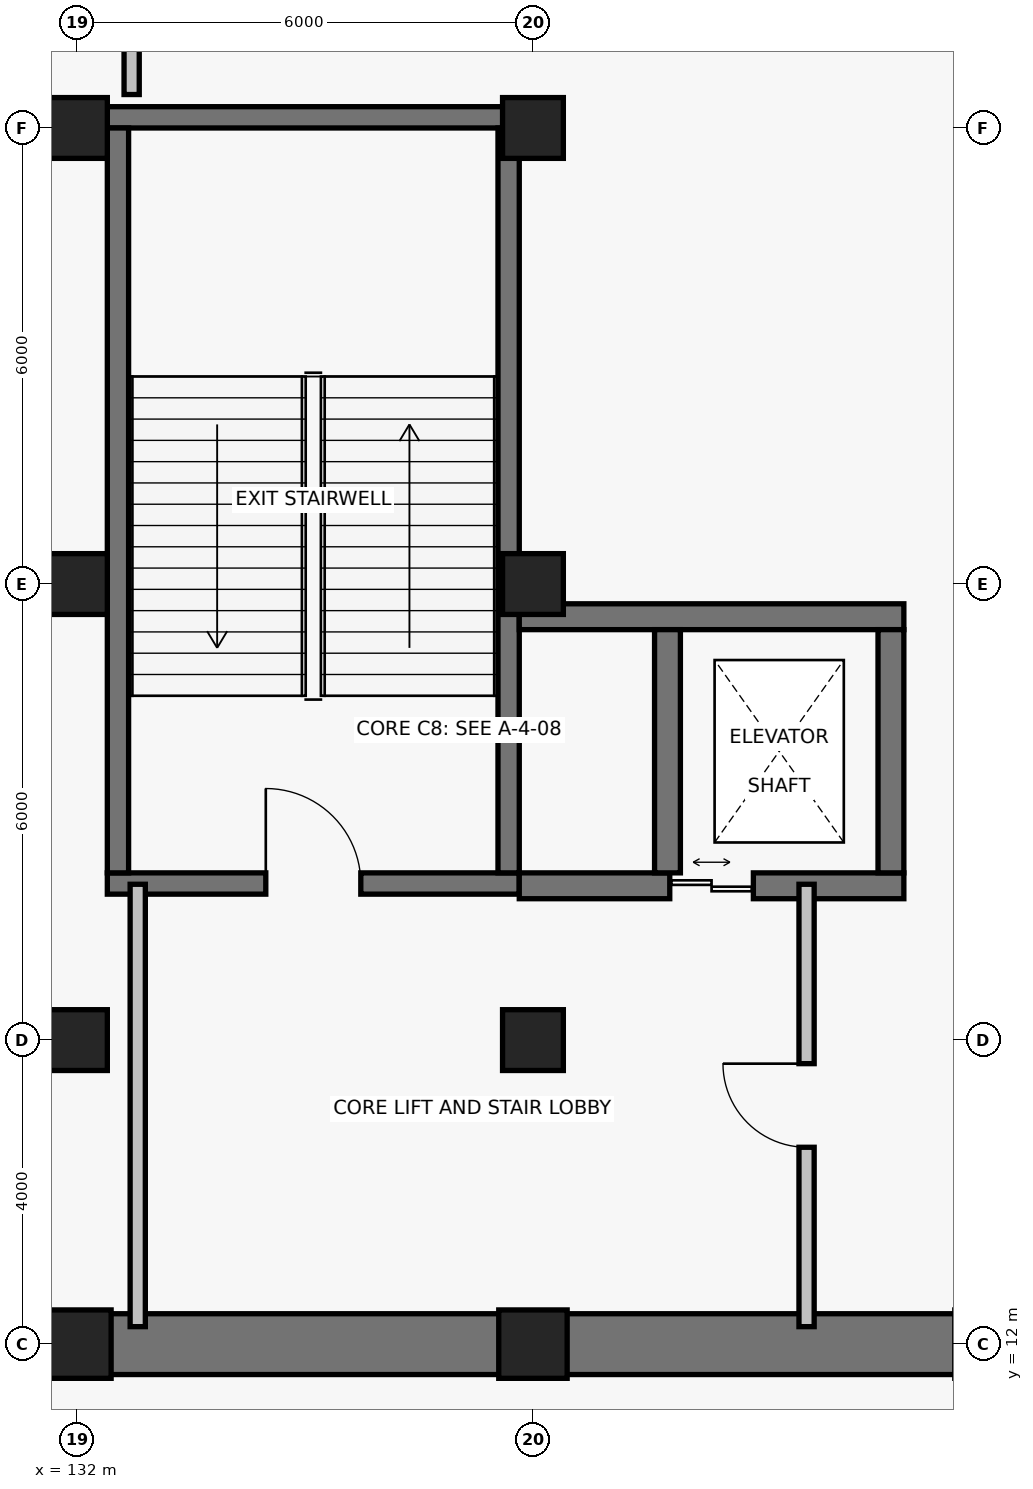
"""IFC4 building model, lengths in metres.
Left out: names, types, materials, properties, quantities, classifications, styles, units other than length and angle.
Written with IfcOpenShell. Run it as: python <this file> out.ifc"""

import sys

from ifc_helpers import new_model, si_unit, direction, frame, frame_2d, origin, origin_2d, place, context, subcontext, project, spatial, rectangle, extrude, element, fill, save


model = new_model("IFC4")
c1 = context("Model", 3, precision=1e-05, world=origin(), true_north=direction((0.0, 1.0)))
c2 = subcontext(c1, "Body", "Model", "MODEL_VIEW")
j1 = project(units=[si_unit("LENGTHUNIT", "METRE"), si_unit("PLANEANGLEUNIT", "RADIAN")], contexts=[c1])
p1 = place(None, origin())
s1 = spatial("IfcSite", under=j1, at=p1, CompositionType="ELEMENT")
p2 = place(p1, origin())
s2 = spatial("IfcBuilding", under=s1, at=p2, CompositionType="ELEMENT")
p3 = place(p2, frame((0.0, 0.0, -10.4)))
s3 = spatial("IfcBuildingStorey", under=s2, at=p3, CompositionType="ELEMENT", Elevation=-10.4)
p4 = place(p3, frame((132.0, 12.0, 0.0), z_axis=(0.0, 0.0, 1.0), x_axis=(1.0, 0.0, 0.0)))
e1 = element("IfcColumn", 1, at=p4, inside=s3, PredefinedType="COLUMN", context=c2, shape_type="SweptSolid", body=[
    extrude(rectangle(XDim=0.9, YDim=0.9, at=origin_2d()), origin(), (0.0, 0.0, 1.0), 5.6),
])
for number, where, z_axis, x_axis in (
    (2, (132.0, 16.0, 0.0), (0.0, 0.0, 1.0), (1.0, 0.0, 0.0)),
    (3, (132.0, 22.0, 0.0), (0.0, 0.0, 1.0), (1.0, 0.0, 0.0)),
    (4, (132.0, 28.0, 0.0), (0.0, 0.0, 1.0), (1.0, 0.0, 0.0)),
):
    element("IfcColumn", number, at=place(p3, frame(where, z_axis=z_axis, x_axis=x_axis)), inside=s3, PredefinedType="COLUMN", context=c2, shape_type="SweptSolid", body=[
        extrude(rectangle(XDim=0.8, YDim=0.8, at=origin_2d()), origin(), (0.0, 0.0, 1.0), 5.6),
    ])
p5 = place(p3, frame((138.0, 12.0, 0.0), z_axis=(0.0, 0.0, 1.0), x_axis=(1.0, 0.0, 0.0)))
e5 = element("IfcColumn", 5, at=p5, inside=s3, PredefinedType="COLUMN", context=c2, shape_type="SweptSolid", body=[
    extrude(rectangle(XDim=0.9, YDim=0.9, at=origin_2d()), origin(), (0.0, 0.0, 1.0), 5.6),
])
for number, where, z_axis, x_axis in (
    (6, (138.0, 16.0, 0.0), (0.0, 0.0, 1.0), (1.0, 0.0, 0.0)),
    (7, (138.0, 22.0, 0.0), (0.0, 0.0, 1.0), (1.0, 0.0, 0.0)),
    (8, (138.0, 28.0, 0.0), (0.0, 0.0, 1.0), (1.0, 0.0, 0.0)),
):
    element("IfcColumn", number, at=place(p3, frame(where, z_axis=z_axis, x_axis=x_axis)), inside=s3, PredefinedType="COLUMN", context=c2, shape_type="SweptSolid", body=[
        extrude(rectangle(XDim=0.8, YDim=0.8, at=origin_2d()), origin(), (0.0, 0.0, 1.0), 5.6),
    ])
for number, where, z_axis, x_axis in (
    (9, (108.0, 12.0, 0.0), (0.0, 0.0, 1.0), (1.0, 0.0, 0.0)),
    (10, (138.0, 12.0, 0.0), (0.0, 0.0, 1.0), (1.0, 0.0, 0.0)),
):
    element("IfcWall", number, at=place(p3, frame(where, z_axis=z_axis, x_axis=x_axis)), inside=s3, PredefinedType="USERDEFINED", context=c2, shape_type="SweptSolid", body=[
        extrude(rectangle(XDim=30.0, YDim=0.8, at=frame_2d((15.0, 0.0))), origin(), (0.0, 0.0, 1.0), 5.15),
    ])
p6 = place(p3, frame((132.4, 18.06, 0.0), z_axis=(0.0, 0.0, 1.0), x_axis=(1.0, 0.0, 0.0)))
e11 = element("IfcWall", 11, at=p6, inside=s3, PredefinedType="SHEAR", context=c2, shape_type="SweptSolid", body=[
    extrude(rectangle(XDim=5.42, YDim=0.28, at=frame_2d((2.71, 0.0))), origin(), (0.0, 0.0, 1.0), 5.15),
])
p7 = place(p6, frame((2.085, 0.0, 0.0)))
e12 = element("IfcOpeningElement", 12, at=p7, cuts=e11, PredefinedType="OPENING", context=c2, shape_type="SweptSolid", body=[
    extrude(rectangle(XDim=1.25, YDim=2.2, at=frame_2d((0.625, 1.1))), frame((0.0, 0.155, 0.0), z_axis=(0.0, -1.0, 0.0), x_axis=(1.0, 0.0, 0.0)), (0.0, 0.0, 1.0), 0.31),
])
p8 = place(p3, frame((137.82, 28.14, 0.0), z_axis=(0.0, 0.0, 1.0), x_axis=(-1.0, 0.0, 0.0)))
e13 = element("IfcWall", 13, at=p8, inside=s3, PredefinedType="SHEAR", context=c2, shape_type="SweptSolid", body=[
    extrude(rectangle(XDim=5.42, YDim=0.28, at=frame_2d((2.71, 0.0))), origin(), (0.0, 0.0, 1.0), 5.15),
])
for number, where, z_axis, x_axis in (
    (14, (132.54, 28.0, 0.0), (0.0, 0.0, 1.0), (0.0, -1.0, 0.0)),
    (15, (137.68, 18.2, 0.0), (0.0, 0.0, 1.0), (0.0, 1.0, 0.0)),
):
    element("IfcWall", number, at=place(p3, frame(where, z_axis=z_axis, x_axis=x_axis)), inside=s3, PredefinedType="SHEAR", context=c2, shape_type="SweptSolid", body=[
        extrude(rectangle(XDim=9.8, YDim=0.28, at=frame_2d((4.9, 0.0))), origin(), (0.0, 0.0, 1.0), 5.15),
    ])
p9 = place(p3, frame((137.82, 18.03, 0.0), z_axis=(0.0, 0.0, 1.0), x_axis=(1.0, 0.0, 0.0)))
e16 = element("IfcWall", 16, at=p9, inside=s3, PredefinedType="SHEAR", context=c2, shape_type="SweptSolid", body=[
    extrude(rectangle(XDim=5.06, YDim=0.34, at=frame_2d((2.53, 0.0))), origin(), (0.0, 0.0, 1.0), 5.15),
])
p10 = place(p9, frame((1.98, 0.0, 0.0)))
e17 = element("IfcOpeningElement", 17, at=p10, cuts=e16, PredefinedType="OPENING", context=c2, shape_type="SweptSolid", body=[
    extrude(rectangle(XDim=1.1, YDim=2.2, at=frame_2d((0.55, 1.1))), frame((0.0, 0.185, 0.0), z_axis=(0.0, -1.0, 0.0), x_axis=(1.0, 0.0, 0.0)), (0.0, 0.0, 1.0), 0.37),
])
p11 = place(p3, frame((142.88, 21.57, 0.0), z_axis=(0.0, 0.0, 1.0), x_axis=(-1.0, 0.0, 0.0)))
e18 = element("IfcWall", 18, at=p11, inside=s3, PredefinedType="SHEAR", context=c2, shape_type="SweptSolid", body=[
    extrude(rectangle(XDim=5.06, YDim=0.34, at=frame_2d((2.53, 0.0))), origin(), (0.0, 0.0, 1.0), 5.15),
])
for number, where, z_axis, x_axis in (
    (19, (139.77, 21.4, 0.0), (0.0, 0.0, 1.0), (0.0, -1.0, 0.0)),
    (20, (142.71, 18.2, 0.0), (0.0, 0.0, 1.0), (0.0, 1.0, 0.0)),
):
    element("IfcWall", number, at=place(p3, frame(where, z_axis=z_axis, x_axis=x_axis)), inside=s3, PredefinedType="SHEAR", context=c2, shape_type="SweptSolid", body=[
        extrude(rectangle(XDim=3.2, YDim=0.34, at=frame_2d((1.6, 0.0))), origin(), (0.0, 0.0, 1.0), 5.15),
    ])
p12 = place(p3, frame((132.8, 18.05, 0.0), z_axis=(0.0, 0.0, 1.0), x_axis=(0.0, -1.0, 0.0)))
e21 = element("IfcWall", 21, at=p12, inside=s3, PredefinedType="PARTITIONING", context=c2, shape_type="SweptSolid", body=[
    extrude(rectangle(XDim=5.82, YDim=0.2, at=frame_2d((2.91, 0.0))), origin(), (0.0, 0.0, 1.0), 4.68),
])
p13 = place(p3, frame((141.6, 12.23, 0.0), z_axis=(0.0, 0.0, 1.0), x_axis=(0.0, 1.0, 0.0)))
e22 = element("IfcWall", 22, at=p13, inside=s3, PredefinedType="PARTITIONING", context=c2, shape_type="SweptSolid", body=[
    extrude(rectangle(XDim=5.82, YDim=0.2, at=frame_2d((2.91, 0.0))), origin(), (0.0, 0.0, 1.0), 4.68),
])
p14 = place(p13, frame((2.36, 0.0, 0.0)))
e23 = element("IfcOpeningElement", 23, at=p14, cuts=e22, PredefinedType="OPENING", context=c2, shape_type="SweptSolid", body=[
    extrude(rectangle(XDim=1.1, YDim=2.15, at=frame_2d((0.55, 1.075))), frame((0.0, 0.115, 0.0), z_axis=(0.0, -1.0, 0.0), x_axis=(1.0, 0.0, 0.0)), (0.0, 0.0, 1.0), 0.23),
])
p15 = place(p3, frame((132.72, 39.92, 0.0), z_axis=(0.0, 0.0, 1.0), x_axis=(0.0, -1.0, 0.0)))
e24 = element("IfcWall", 24, at=p15, inside=s3, PredefinedType="PARTITIONING", context=c2, shape_type="SweptSolid", body=[
    extrude(rectangle(XDim=11.48, YDim=0.2, at=frame_2d((5.74, 0.0))), origin(), (0.0, 0.0, 1.0), 4.68),
])
p16 = place(p15, frame((3.633, 0.0, 0.0)))
e25 = element("IfcOpeningElement", 25, at=p16, cuts=e24, PredefinedType="OPENING", context=c2, shape_type="SweptSolid", body=[
    extrude(rectangle(XDim=1.1, YDim=2.15, at=frame_2d((0.55, 1.075))), frame((0.0, 0.115, 0.0), z_axis=(0.0, -1.0, 0.0), x_axis=(1.0, 0.0, 0.0)), (0.0, 0.0, 1.0), 0.23),
])
p17 = place(p7, origin())
e26 = element("IfcDoor", 26, at=p17, inside=s3, OperationType="SINGLE_SWING_LEFT", PredefinedType="DOOR", context=c2, shape_type="SweptSolid", body=[
    extrude(rectangle(XDim=1.25, YDim=2.2, at=frame_2d((0.625, 1.1))), frame((0.0, 0.025, 0.0), z_axis=(0.0, -1.0, 0.0), x_axis=(1.0, 0.0, 0.0)), (0.0, 0.0, 1.0), 0.05),
])
fill(e12, e26)
p18 = place(p10, origin())
e27 = element("IfcDoor", 27, at=p18, inside=s3, OperationType="DOUBLE_DOOR_SLIDING", PredefinedType="DOOR", context=c2, shape_type="SweptSolid", body=[
    extrude(rectangle(XDim=1.1, YDim=2.2, at=frame_2d((0.55, 1.1))), frame((0.0, 0.025, 0.0), z_axis=(0.0, -1.0, 0.0), x_axis=(1.0, 0.0, 0.0)), (0.0, 0.0, 1.0), 0.05),
])
fill(e17, e27)
p19 = place(p14, origin())
e28 = element("IfcDoor", 28, at=p19, inside=s3, OperationType="SINGLE_SWING_RIGHT", PredefinedType="DOOR", context=c2, shape_type="SweptSolid", body=[
    extrude(rectangle(XDim=1.1, YDim=2.15, at=frame_2d((0.55, 1.075))), frame((0.0, 0.025, 0.0), z_axis=(0.0, -1.0, 0.0), x_axis=(1.0, 0.0, 0.0)), (0.0, 0.0, 1.0), 0.05),
])
fill(e23, e28)
save(model, sys.argv[1])
